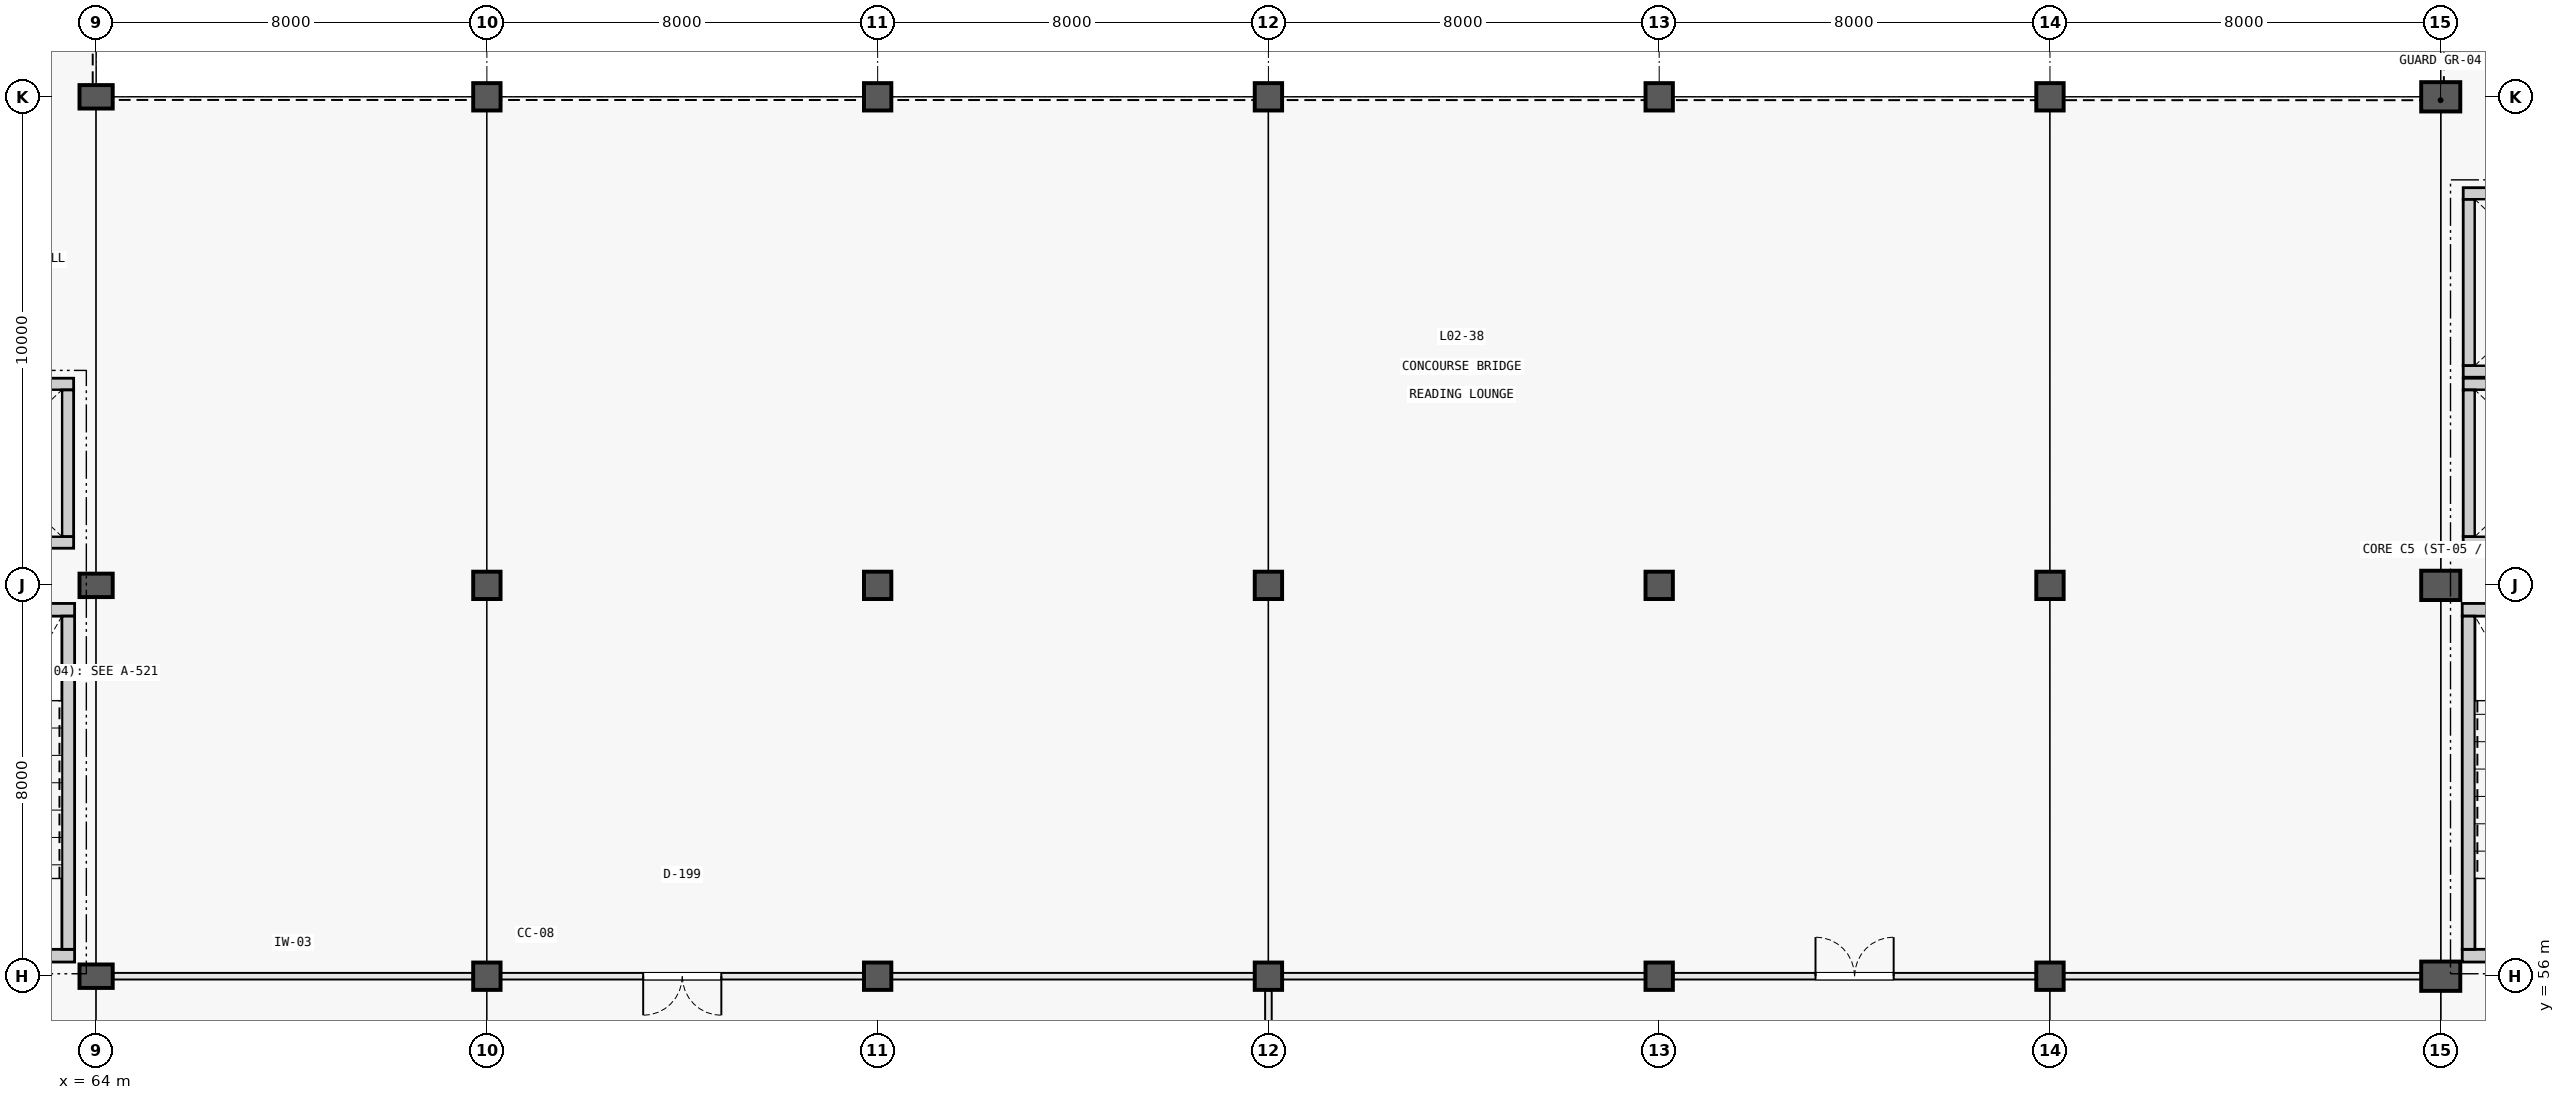
"""IFC4 building model, lengths in metres.
Left out: names, types, materials, properties, quantities, classifications, styles, units other than length and angle.
Written with IfcOpenShell. Run it as: python <this file> out.ifc"""

import sys

from ifc_helpers import new_model, si_unit, direction, frame, frame_2d, origin, origin_2d, place, context, subcontext, project, spatial, rectangle, circle, extrude, element, fill, save


model = new_model("IFC4")
c1 = context("Model", 3, precision=1e-05, world=origin(), true_north=direction((0.0, 1.0)))
c2 = subcontext(c1, "Body", "Model", "MODEL_VIEW")
j1 = project(units=[si_unit("LENGTHUNIT", "METRE"), si_unit("PLANEANGLEUNIT", "RADIAN")], contexts=[c1])
p1 = place(None, origin())
s1 = spatial("IfcSite", under=j1, at=p1, CompositionType="ELEMENT")
p2 = place(p1, origin())
s2 = spatial("IfcBuilding", under=s1, at=p2, CompositionType="ELEMENT")
p3 = place(p2, frame((0.0, 0.0, 5.4)))
s3 = spatial("IfcBuildingStorey", under=s2, at=p3, CompositionType="ELEMENT", Elevation=5.4)
for number, where, z_axis, x_axis in (
    (1, (64.0, 56.0, 0.0), (0.0, 0.0, 1.0), (1.0, 0.0, 0.0)),
    (2, (64.0, 64.0, 0.0), (0.0, 0.0, 1.0), (1.0, 0.0, 0.0)),
    (3, (64.0, 74.0, 0.0), (0.0, 0.0, 1.0), (1.0, 0.0, 0.0)),
):
    element("IfcColumn", number, at=place(p3, frame(where, z_axis=z_axis, x_axis=x_axis)), inside=s3, PredefinedType="COLUMN", context=c2, shape_type="SweptSolid", body=[
        extrude(rectangle(XDim=0.68, YDim=0.48, at=origin_2d()), origin(), (0.0, 0.0, 1.0), 5.1),
    ])
for number, where, z_axis, x_axis in (
    (4, (72.0, 56.0, 0.0), (0.0, 0.0, 1.0), (1.0, 0.0, 0.0)),
    (5, (72.0, 64.0, 0.0), (0.0, 0.0, 1.0), (1.0, 0.0, 0.0)),
    (6, (72.0, 74.0, 0.0), (0.0, 0.0, 1.0), (1.0, 0.0, 0.0)),
    (7, (80.0, 56.0, 0.0), (0.0, 0.0, 1.0), (1.0, 0.0, 0.0)),
    (8, (80.0, 64.0, 0.0), (0.0, 0.0, 1.0), (1.0, 0.0, 0.0)),
    (9, (80.0, 74.0, 0.0), (0.0, 0.0, 1.0), (1.0, 0.0, 0.0)),
    (10, (88.0, 56.0, 0.0), (0.0, 0.0, 1.0), (1.0, 0.0, 0.0)),
    (11, (88.0, 64.0, 0.0), (0.0, 0.0, 1.0), (1.0, 0.0, 0.0)),
    (12, (88.0, 74.0, 0.0), (0.0, 0.0, 1.0), (1.0, 0.0, 0.0)),
    (13, (96.0, 56.0, 0.0), (0.0, 0.0, 1.0), (1.0, 0.0, 0.0)),
    (14, (96.0, 64.0, 0.0), (0.0, 0.0, 1.0), (1.0, 0.0, 0.0)),
    (15, (96.0, 74.0, 0.0), (0.0, 0.0, 1.0), (1.0, 0.0, 0.0)),
    (16, (104.0, 56.0, 0.0), (0.0, 0.0, 1.0), (1.0, 0.0, 0.0)),
    (17, (104.0, 64.0, 0.0), (0.0, 0.0, 1.0), (1.0, 0.0, 0.0)),
    (18, (104.0, 74.0, 0.0), (0.0, 0.0, 1.0), (1.0, 0.0, 0.0)),
):
    element("IfcColumn", number, at=place(p3, frame(where, z_axis=z_axis, x_axis=x_axis)), inside=s3, PredefinedType="COLUMN", context=c2, shape_type="SweptSolid", body=[
        extrude(circle(Radius=0.28, at=origin_2d()), origin(), (0.0, 0.0, 1.0), 5.1),
    ])
for number, where, z_axis, x_axis in (
    (19, (112.0, 56.0, 0.0), (0.0, 0.0, 1.0), (1.0, 0.0, 0.0)),
    (20, (112.0, 64.0, 0.0), (0.0, 0.0, 1.0), (1.0, 0.0, 0.0)),
    (21, (112.0, 74.0, 0.0), (0.0, 0.0, 1.0), (1.0, 0.0, 0.0)),
):
    element("IfcColumn", number, at=place(p3, frame(where, z_axis=z_axis, x_axis=x_axis)), inside=s3, PredefinedType="COLUMN", context=c2, shape_type="SweptSolid", body=[
        extrude(rectangle(XDim=0.8, YDim=0.6, at=origin_2d()), origin(), (0.0, 0.0, 1.0), 5.1),
    ])
p4 = place(p3, frame((112.44, 56.42, 0.0), z_axis=(0.0, 0.0, 1.0), x_axis=(1.0, 0.0, 0.0)))
e22 = element("IfcWall", 22, at=p4, inside=s3, PredefinedType="SOLIDWALL", context=c2, shape_type="SweptSolid", body=[
    extrude(rectangle(XDim=3.58, YDim=0.26, at=frame_2d((1.79, 0.0))), origin(), (0.0, 0.0, 1.0), 5.1),
])
p5 = place(p4, frame((1.56, 0.0, 0.0)))
e23 = element("IfcOpeningElement", 23, at=p5, cuts=e22, PredefinedType="OPENING", context=c2, shape_type="SweptSolid", body=[
    extrude(rectangle(XDim=1.1, YDim=2.2, at=frame_2d((0.55, 1.1))), frame((0.0, 0.142, 0.0), z_axis=(0.0, -1.0, 0.0), x_axis=(1.0, 0.0, 0.0)), (0.0, 0.0, 1.0), 0.284),
])
p6 = place(p3, frame((112.44, 63.5, 0.0), z_axis=(0.0, 0.0, 1.0), x_axis=(1.0, 0.0, 0.0)))
e24 = element("IfcWall", 24, at=p6, inside=s3, PredefinedType="SOLIDWALL", context=c2, shape_type="SweptSolid", body=[
    extrude(rectangle(XDim=3.58, YDim=0.26, at=frame_2d((1.79, 0.0))), origin(), (0.0, 0.0, 1.0), 5.1),
])
p7 = place(p3, frame((112.57, 56.55, 0.0), z_axis=(0.0, 0.0, 1.0), x_axis=(0.0, 1.0, 0.0)))
e25 = element("IfcWall", 25, at=p7, inside=s3, PredefinedType="SOLIDWALL", context=c2, shape_type="SweptSolid", body=[
    extrude(rectangle(XDim=6.82, YDim=0.26, at=frame_2d((3.41, 0.0))), origin(), (0.0, 0.0, 1.0), 5.1),
])
p8 = place(p3, frame((59.98, 56.42, 0.0), z_axis=(0.0, 0.0, 1.0), x_axis=(1.0, 0.0, 0.0)))
e26 = element("IfcWall", 26, at=p8, inside=s3, PredefinedType="SOLIDWALL", context=c2, shape_type="SweptSolid", body=[
    extrude(rectangle(XDim=3.58, YDim=0.26, at=frame_2d((1.79, 0.0))), origin(), (0.0, 0.0, 1.0), 5.1),
])
p9 = place(p8, frame((0.92, 0.0, 0.0)))
e27 = element("IfcOpeningElement", 27, at=p9, cuts=e26, PredefinedType="OPENING", context=c2, shape_type="SweptSolid", body=[
    extrude(rectangle(XDim=1.1, YDim=2.2, at=frame_2d((0.55, 1.1))), frame((0.0, 0.142, 0.0), z_axis=(0.0, -1.0, 0.0), x_axis=(1.0, 0.0, 0.0)), (0.0, 0.0, 1.0), 0.284),
])
p10 = place(p3, frame((59.98, 63.5, 0.0), z_axis=(0.0, 0.0, 1.0), x_axis=(1.0, 0.0, 0.0)))
e28 = element("IfcWall", 28, at=p10, inside=s3, PredefinedType="SOLIDWALL", context=c2, shape_type="SweptSolid", body=[
    extrude(rectangle(XDim=3.58, YDim=0.26, at=frame_2d((1.79, 0.0))), origin(), (0.0, 0.0, 1.0), 5.1),
])
p11 = place(p3, frame((63.43, 56.55, 0.0), z_axis=(0.0, 0.0, 1.0), x_axis=(0.0, 1.0, 0.0)))
e29 = element("IfcWall", 29, at=p11, inside=s3, PredefinedType="SOLIDWALL", context=c2, shape_type="SweptSolid", body=[
    extrude(rectangle(XDim=6.82, YDim=0.26, at=frame_2d((3.41, 0.0))), origin(), (0.0, 0.0, 1.0), 5.1),
])
for number, where, z_axis, x_axis in (
    (30, (112.46, 64.88, 0.0), (0.0, 0.0, 1.0), (1.0, 0.0, 0.0)),
    (31, (112.46, 68.12, 0.0), (0.0, 0.0, 1.0), (1.0, 0.0, 0.0)),
):
    element("IfcWall", number, at=place(p3, frame(where, z_axis=z_axis, x_axis=x_axis)), inside=s3, PredefinedType="SOLIDWALL", context=c2, shape_type="SweptSolid", body=[
        extrude(rectangle(XDim=3.68, YDim=0.24, at=frame_2d((1.84, 0.0))), origin(), (0.0, 0.0, 1.0), 5.1),
    ])
p12 = place(p3, frame((112.58, 65.0, 0.0), z_axis=(0.0, 0.0, 1.0), x_axis=(0.0, 1.0, 0.0)))
e32 = element("IfcWall", 32, at=p12, inside=s3, PredefinedType="SOLIDWALL", context=c2, shape_type="SweptSolid", body=[
    extrude(rectangle(XDim=3.0, YDim=0.24, at=frame_2d((1.5, 0.0))), origin(), (0.0, 0.0, 1.0), 5.1),
])
for number, where, z_axis, x_axis in (
    (33, (112.46, 68.38, 0.0), (0.0, 0.0, 1.0), (1.0, 0.0, 0.0)),
    (34, (112.46, 72.02, 0.0), (0.0, 0.0, 1.0), (1.0, 0.0, 0.0)),
):
    element("IfcWall", number, at=place(p3, frame(where, z_axis=z_axis, x_axis=x_axis)), inside=s3, PredefinedType="SOLIDWALL", context=c2, shape_type="SweptSolid", body=[
        extrude(rectangle(XDim=4.08, YDim=0.24, at=frame_2d((2.04, 0.0))), origin(), (0.0, 0.0, 1.0), 5.1),
    ])
p13 = place(p3, frame((112.58, 68.5, 0.0), z_axis=(0.0, 0.0, 1.0), x_axis=(0.0, 1.0, 0.0)))
e35 = element("IfcWall", 35, at=p13, inside=s3, PredefinedType="SOLIDWALL", context=c2, shape_type="SweptSolid", body=[
    extrude(rectangle(XDim=3.4, YDim=0.24, at=frame_2d((1.7, 0.0))), origin(), (0.0, 0.0, 1.0), 5.1),
])
for number, where, z_axis, x_axis in (
    (36, (59.86, 64.88, 0.0), (0.0, 0.0, 1.0), (1.0, 0.0, 0.0)),
    (37, (59.86, 68.12, 0.0), (0.0, 0.0, 1.0), (1.0, 0.0, 0.0)),
):
    element("IfcWall", number, at=place(p3, frame(where, z_axis=z_axis, x_axis=x_axis)), inside=s3, PredefinedType="SOLIDWALL", context=c2, shape_type="SweptSolid", body=[
        extrude(rectangle(XDim=3.68, YDim=0.24, at=frame_2d((1.84, 0.0))), origin(), (0.0, 0.0, 1.0), 5.1),
    ])
p14 = place(p3, frame((63.42, 65.0, 0.0), z_axis=(0.0, 0.0, 1.0), x_axis=(0.0, 1.0, 0.0)))
e38 = element("IfcWall", 38, at=p14, inside=s3, PredefinedType="SOLIDWALL", context=c2, shape_type="SweptSolid", body=[
    extrude(rectangle(XDim=3.0, YDim=0.24, at=frame_2d((1.5, 0.0))), origin(), (0.0, 0.0, 1.0), 5.1),
])
p15 = place(p3, frame((64.35, 56.0, 0.0), z_axis=(0.0, 0.0, 1.0), x_axis=(1.0, 0.0, 0.0)))
e39 = element("IfcWall", 39, at=p15, inside=s3, PredefinedType="PARTITIONING", context=c2, shape_type="SweptSolid", body=[
    extrude(rectangle(XDim=7.36, YDim=0.135, at=frame_2d((3.68, 0.0))), origin(), (0.0, 0.0, 1.0), 3.61),
])
p16 = place(p3, frame((72.29, 56.0, 0.0), z_axis=(0.0, 0.0, 1.0), x_axis=(1.0, 0.0, 0.0)))
e40 = element("IfcWall", 40, at=p16, inside=s3, PredefinedType="PARTITIONING", context=c2, shape_type="SweptSolid", body=[
    extrude(rectangle(XDim=7.42, YDim=0.135, at=frame_2d((3.71, 0.0))), origin(), (0.0, 0.0, 1.0), 3.61),
])
p17 = place(p16, frame((2.91, 0.0, 0.0)))
e41 = element("IfcOpeningElement", 41, at=p17, cuts=e40, PredefinedType="OPENING", context=c2, shape_type="SweptSolid", body=[
    extrude(rectangle(XDim=1.6, YDim=2.2, at=frame_2d((0.8, 1.1))), frame((0.0, 0.08, 0.0), z_axis=(0.0, -1.0, 0.0), x_axis=(1.0, 0.0, 0.0)), (0.0, 0.0, 1.0), 0.159),
])
for number, where, z_axis, x_axis in (
    (42, (80.29, 56.0, 0.0), (0.0, 0.0, 1.0), (1.0, 0.0, 0.0)),
    (43, (88.29, 56.0, 0.0), (0.0, 0.0, 1.0), (1.0, 0.0, 0.0)),
):
    element("IfcWall", number, at=place(p3, frame(where, z_axis=z_axis, x_axis=x_axis)), inside=s3, PredefinedType="PARTITIONING", context=c2, shape_type="SweptSolid", body=[
        extrude(rectangle(XDim=7.42, YDim=0.135, at=frame_2d((3.71, 0.0))), origin(), (0.0, 0.0, 1.0), 3.61),
    ])
p18 = place(p3, frame((96.29, 56.0, 0.0), z_axis=(0.0, 0.0, 1.0), x_axis=(1.0, 0.0, 0.0)))
e44 = element("IfcWall", 44, at=p18, inside=s3, PredefinedType="PARTITIONING", context=c2, shape_type="SweptSolid", body=[
    extrude(rectangle(XDim=7.42, YDim=0.135, at=frame_2d((3.71, 0.0))), origin(), (0.0, 0.0, 1.0), 3.61),
])
p19 = place(p18, frame((2.91, 0.0, 0.0)))
e45 = element("IfcOpeningElement", 45, at=p19, cuts=e44, PredefinedType="OPENING", context=c2, shape_type="SweptSolid", body=[
    extrude(rectangle(XDim=1.6, YDim=2.2, at=frame_2d((0.8, 1.1))), frame((0.0, 0.08, 0.0), z_axis=(0.0, -1.0, 0.0), x_axis=(1.0, 0.0, 0.0)), (0.0, 0.0, 1.0), 0.159),
])
p20 = place(p3, frame((104.29, 56.0, 0.0), z_axis=(0.0, 0.0, 1.0), x_axis=(1.0, 0.0, 0.0)))
e46 = element("IfcWall", 46, at=p20, inside=s3, PredefinedType="PARTITIONING", context=c2, shape_type="SweptSolid", body=[
    extrude(rectangle(XDim=7.3, YDim=0.135, at=frame_2d((3.65, 0.0))), origin(), (0.0, 0.0, 1.0), 3.61),
])
p21 = place(p3, frame((88.0, 48.29, 0.0), z_axis=(0.0, 0.0, 1.0), x_axis=(0.0, 1.0, 0.0)))
e47 = element("IfcWall", 47, at=p21, inside=s3, PredefinedType="PARTITIONING", context=c2, shape_type="SweptSolid", body=[
    extrude(rectangle(XDim=7.42, YDim=0.135, at=frame_2d((3.71, 0.0))), origin(), (0.0, 0.0, 1.0), 3.61),
])
p22 = place(p17, frame((1.6, 0.0, 0.0), z_axis=(0.0, 0.0, 1.0), x_axis=(-1.0, 0.0, 0.0)))
e48 = element("IfcDoor", 48, at=p22, inside=s3, OperationType="DOUBLE_DOOR_SINGLE_SWING", PredefinedType="DOOR", context=c2, shape_type="SweptSolid", body=[
    extrude(rectangle(XDim=1.6, YDim=2.2, at=frame_2d((0.8, 1.1))), frame((0.0, 0.025, 0.0), z_axis=(0.0, -1.0, 0.0), x_axis=(1.0, 0.0, 0.0)), (0.0, 0.0, 1.0), 0.05),
])
fill(e41, e48)
p23 = place(p19, origin())
e49 = element("IfcDoor", 49, at=p23, inside=s3, OperationType="DOUBLE_DOOR_SINGLE_SWING", PredefinedType="DOOR", context=c2, shape_type="SweptSolid", body=[
    extrude(rectangle(XDim=1.6, YDim=2.2, at=frame_2d((0.8, 1.1))), frame((0.0, 0.025, 0.0), z_axis=(0.0, -1.0, 0.0), x_axis=(1.0, 0.0, 0.0)), (0.0, 0.0, 1.0), 0.05),
])
fill(e45, e49)
save(model, sys.argv[1])
